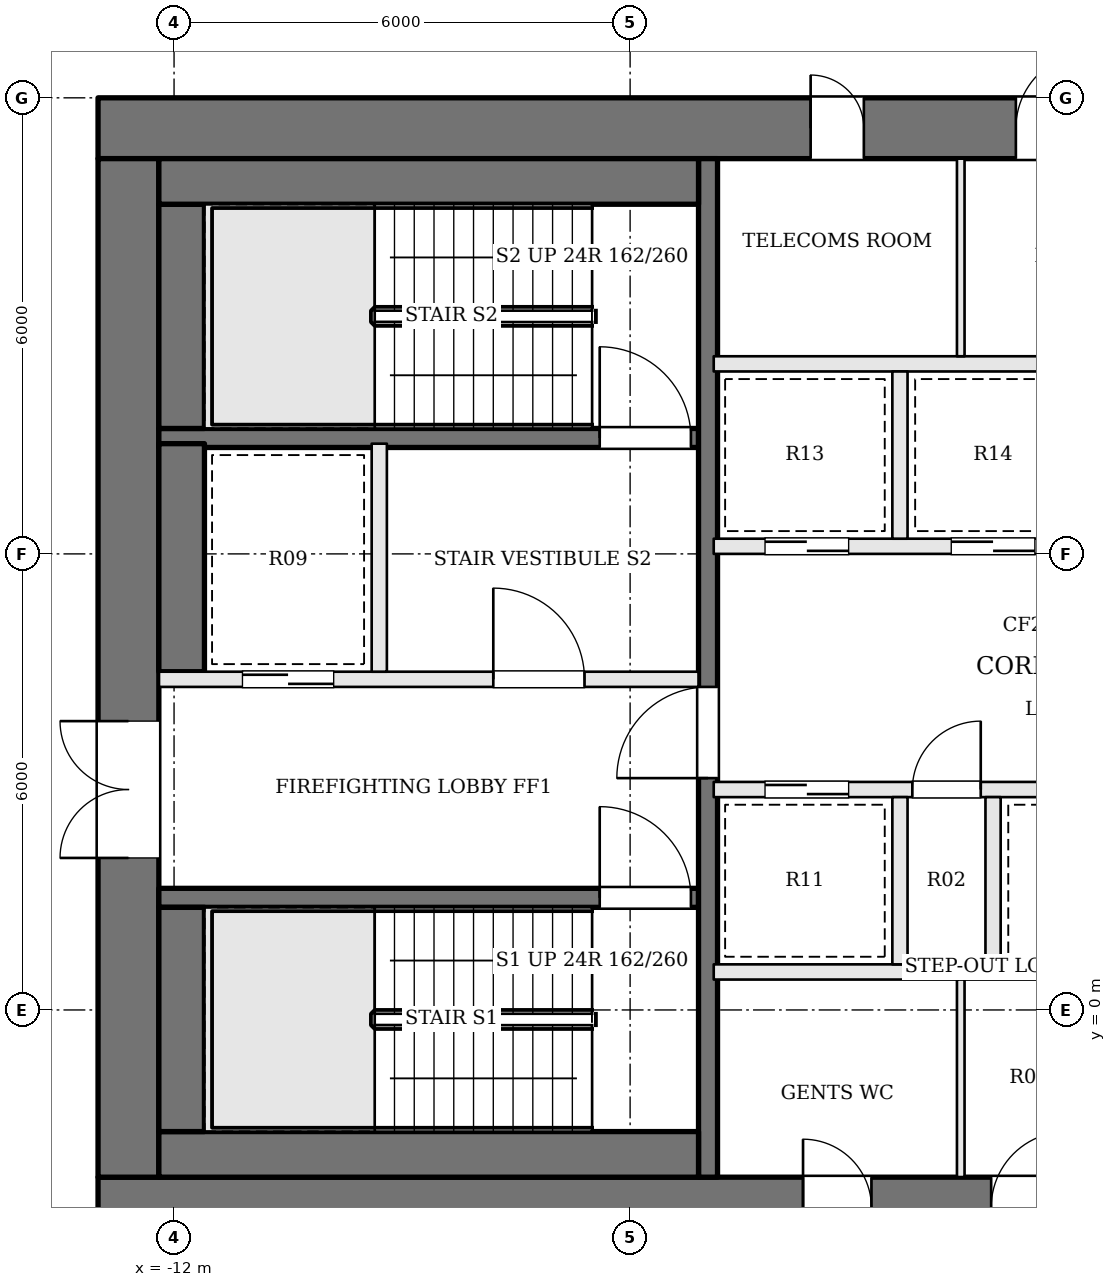
"""IFC4 building model, lengths in metres.
Left out: names, types, materials, properties, quantities, classifications, styles, units other than length and angle.
Written with IfcOpenShell. Run it as: python <this file> out.ifc"""

import sys

from ifc_helpers import new_model, si_unit, direction, frame, frame_2d, origin, place, context, subcontext, project, spatial, rectangle, extrude, element, fill, save


model = new_model("IFC4")
c1 = context("Model", 3, precision=1e-05, world=origin(), true_north=direction((0.0, 1.0)))
c2 = subcontext(c1, "Body", "Model", "MODEL_VIEW")
j1 = project(units=[si_unit("LENGTHUNIT", "METRE"), si_unit("PLANEANGLEUNIT", "RADIAN")], contexts=[c1])
p1 = place(None, origin())
s1 = spatial("IfcSite", under=j1, at=p1, CompositionType="ELEMENT")
p2 = place(p1, origin())
s2 = spatial("IfcBuilding", under=s1, at=p2, CompositionType="ELEMENT")
p3 = place(p2, frame((0.0, 0.0, 209.1)))
s3 = spatial("IfcBuildingStorey", under=s2, at=p3, CompositionType="ELEMENT", Elevation=209.1)
p4 = place(p3, frame((-13.0, 11.6, 0.0), z_axis=(0.0, 0.0, 1.0), x_axis=(1.0, 0.0, 0.0)))
e1 = element("IfcWall", 1, at=p4, inside=s3, PredefinedType="SHEAR", context=c2, shape_type="SweptSolid", body=[
    extrude(rectangle(XDim=26.0, YDim=0.8, at=frame_2d((13.0, 0.0))), origin(), (0.0, 0.0, 1.0), 3.9),
])
p5 = place(p4, frame((9.375, 0.0, 0.0)))
e2 = element("IfcOpeningElement", 2, at=p5, cuts=e1, PredefinedType="OPENING", context=c2, shape_type="SweptSolid", body=[
    extrude(rectangle(XDim=0.7, YDim=2.1, at=frame_2d((0.35, 1.05))), frame((0.0, 0.41, 0.0), z_axis=(0.0, -1.0, 0.0), x_axis=(1.0, 0.0, 0.0)), (0.0, 0.0, 1.0), 0.82),
])
p6 = place(p4, frame((12.075, 0.0, 0.0)))
e3 = element("IfcOpeningElement", 3, at=p6, cuts=e1, PredefinedType="OPENING", context=c2, shape_type="SweptSolid", body=[
    extrude(rectangle(XDim=1.0, YDim=2.1, at=frame_2d((0.5, 1.05))), frame((0.0, 0.41, 0.0), z_axis=(0.0, -1.0, 0.0), x_axis=(1.0, 0.0, 0.0)), (0.0, 0.0, 1.0), 0.82),
])
p7 = place(p4, frame((14.675, 0.0, 0.0)))
e4 = element("IfcOpeningElement", 4, at=p7, cuts=e1, PredefinedType="OPENING", context=c2, shape_type="SweptSolid", body=[
    extrude(rectangle(XDim=0.7, YDim=2.1, at=frame_2d((0.35, 1.05))), frame((0.0, 0.41, 0.0), z_axis=(0.0, -1.0, 0.0), x_axis=(1.0, 0.0, 0.0)), (0.0, 0.0, 1.0), 0.82),
])
p8 = place(p4, frame((16.625, 0.0, 0.0)))
e5 = element("IfcOpeningElement", 5, at=p8, cuts=e1, PredefinedType="OPENING", context=c2, shape_type="SweptSolid", body=[
    extrude(rectangle(XDim=0.9, YDim=2.1, at=frame_2d((0.45, 1.05))), frame((0.0, 0.41, 0.0), z_axis=(0.0, -1.0, 0.0), x_axis=(1.0, 0.0, 0.0)), (0.0, 0.0, 1.0), 0.82),
])
p9 = place(p3, frame((-13.0, -2.6, 0.0), z_axis=(0.0, 0.0, 1.0), x_axis=(1.0, 0.0, 0.0)))
e6 = element("IfcWall", 6, at=p9, inside=s3, PredefinedType="SHEAR", context=c2, shape_type="SweptSolid", body=[
    extrude(rectangle(XDim=26.0, YDim=0.8, at=frame_2d((13.0, 0.0))), origin(), (0.0, 0.0, 1.0), 3.9),
])
p10 = place(p9, frame((9.275, 0.0, 0.0)))
e7 = element("IfcOpeningElement", 7, at=p10, cuts=e6, PredefinedType="OPENING", context=c2, shape_type="SweptSolid", body=[
    extrude(rectangle(XDim=0.9, YDim=2.1, at=frame_2d((0.45, 1.05))), frame((0.0, 0.41, 0.0), z_axis=(0.0, -1.0, 0.0), x_axis=(1.0, 0.0, 0.0)), (0.0, 0.0, 1.0), 0.82),
])
p11 = place(p9, frame((11.75, 0.0, 0.0)))
e8 = element("IfcOpeningElement", 8, at=p11, cuts=e6, PredefinedType="OPENING", context=c2, shape_type="SweptSolid", body=[
    extrude(rectangle(XDim=1.0, YDim=2.1, at=frame_2d((0.5, 1.05))), frame((0.0, 0.41, 0.0), z_axis=(0.0, -1.0, 0.0), x_axis=(1.0, 0.0, 0.0)), (0.0, 0.0, 1.0), 0.82),
])
p12 = place(p9, frame((14.325, 0.0, 0.0)))
e9 = element("IfcOpeningElement", 9, at=p12, cuts=e6, PredefinedType="OPENING", context=c2, shape_type="SweptSolid", body=[
    extrude(rectangle(XDim=0.9, YDim=2.1, at=frame_2d((0.45, 1.05))), frame((0.0, 0.41, 0.0), z_axis=(0.0, -1.0, 0.0), x_axis=(1.0, 0.0, 0.0)), (0.0, 0.0, 1.0), 0.82),
])
p13 = place(p9, frame((16.7, 0.0, 0.0)))
e10 = element("IfcOpeningElement", 10, at=p13, cuts=e6, PredefinedType="OPENING", context=c2, shape_type="SweptSolid", body=[
    extrude(rectangle(XDim=0.9, YDim=2.1, at=frame_2d((0.45, 1.05))), frame((0.0, 0.41, 0.0), z_axis=(0.0, -1.0, 0.0), x_axis=(1.0, 0.0, 0.0)), (0.0, 0.0, 1.0), 0.82),
])
p14 = place(p3, frame((-12.6, -2.2, 0.0), z_axis=(0.0, 0.0, 1.0), x_axis=(0.0, 1.0, 0.0)))
e11 = element("IfcWall", 11, at=p14, inside=s3, PredefinedType="SHEAR", context=c2, shape_type="SweptSolid", body=[
    extrude(rectangle(XDim=13.4, YDim=0.8, at=frame_2d((6.7, 0.0))), origin(), (0.0, 0.0, 1.0), 3.9),
])
p15 = place(p14, frame((4.2, 0.0, 0.0)))
e12 = element("IfcOpeningElement", 12, at=p15, cuts=e11, PredefinedType="OPENING", context=c2, shape_type="SweptSolid", body=[
    extrude(rectangle(XDim=1.8, YDim=2.1, at=frame_2d((0.9, 1.05))), frame((0.0, 0.41, 0.0), z_axis=(0.0, -1.0, 0.0), x_axis=(1.0, 0.0, 0.0)), (0.0, 0.0, 1.0), 0.82),
])
p16 = place(p3, frame((-12.2, 1.475, 0.0), z_axis=(0.0, 0.0, 1.0), x_axis=(1.0, 0.0, 0.0)))
e13 = element("IfcWall", 13, at=p16, inside=s3, PredefinedType="SOLIDWALL", context=c2, shape_type="SweptSolid", body=[
    extrude(rectangle(XDim=7.1, YDim=0.25, at=frame_2d((3.55, 0.0))), origin(), (0.0, 0.0, 1.0), 3.7),
])
p17 = place(p16, frame((5.8, 0.0, 0.0)))
e14 = element("IfcOpeningElement", 14, at=p17, cuts=e13, PredefinedType="OPENING", context=c2, shape_type="SweptSolid", body=[
    extrude(rectangle(XDim=1.2, YDim=2.1, at=frame_2d((0.6, 1.05))), frame((0.0, 0.135, 0.0), z_axis=(0.0, -1.0, 0.0), x_axis=(1.0, 0.0, 0.0)), (0.0, 0.0, 1.0), 0.27),
])
p18 = place(p3, frame((-12.2, 4.35, 0.0), z_axis=(0.0, 0.0, 1.0), x_axis=(1.0, 0.0, 0.0)))
e15 = element("IfcWall", 15, at=p18, inside=s3, PredefinedType="SOLIDWALL", context=c2, shape_type="SweptSolid", body=[
    extrude(rectangle(XDim=7.1, YDim=0.2, at=frame_2d((3.55, 0.0))), origin(), (0.0, 0.0, 1.0), 3.7),
])
p19 = place(p18, frame((4.4, 0.0, 0.0)))
e16 = element("IfcOpeningElement", 16, at=p19, cuts=e15, PredefinedType="OPENING", context=c2, shape_type="SweptSolid", body=[
    extrude(rectangle(XDim=1.2, YDim=2.1, at=frame_2d((0.6, 1.05))), frame((0.0, 0.11, 0.0), z_axis=(0.0, -1.0, 0.0), x_axis=(1.0, 0.0, 0.0)), (0.0, 0.0, 1.0), 0.22),
])
p20 = place(p18, frame((1.1, 0.0, 0.0)))
e17 = element("IfcOpeningElement", 17, at=p20, cuts=e15, PredefinedType="OPENING", context=c2, shape_type="SweptSolid", body=[
    extrude(rectangle(XDim=1.2, YDim=2.1, at=frame_2d((0.6, 1.05))), frame((0.0, 0.11, 0.0), z_axis=(0.0, -1.0, 0.0), x_axis=(1.0, 0.0, 0.0)), (0.0, 0.0, 1.0), 0.22),
])
p21 = place(p3, frame((-12.2, 7.525, 0.0), z_axis=(0.0, 0.0, 1.0), x_axis=(1.0, 0.0, 0.0)))
e18 = element("IfcWall", 18, at=p21, inside=s3, PredefinedType="SOLIDWALL", context=c2, shape_type="SweptSolid", body=[
    extrude(rectangle(XDim=7.1, YDim=0.25, at=frame_2d((3.55, 0.0))), origin(), (0.0, 0.0, 1.0), 3.7),
])
p22 = place(p21, frame((5.8, 0.0, 0.0)))
e19 = element("IfcOpeningElement", 19, at=p22, cuts=e18, PredefinedType="OPENING", context=c2, shape_type="SweptSolid", body=[
    extrude(rectangle(XDim=1.2, YDim=2.1, at=frame_2d((0.6, 1.05))), frame((0.0, 0.135, 0.0), z_axis=(0.0, -1.0, 0.0), x_axis=(1.0, 0.0, 0.0)), (0.0, 0.0, 1.0), 0.27),
])
p23 = place(p3, frame((-9.3, 4.45, 0.0), z_axis=(0.0, 0.0, 1.0), x_axis=(0.0, 1.0, 0.0)))
e20 = element("IfcWall", 20, at=p23, inside=s3, PredefinedType="SOLIDWALL", context=c2, shape_type="SweptSolid", body=[
    extrude(rectangle(XDim=3.0, YDim=0.2, at=frame_2d((1.5, 0.0))), origin(), (0.0, 0.0, 1.0), 3.7),
])
p24 = place(p3, frame((-4.975, -2.2, 0.0), z_axis=(0.0, 0.0, 1.0), x_axis=(0.0, 1.0, 0.0)))
e21 = element("IfcWall", 21, at=p24, inside=s3, PredefinedType="SOLIDWALL", context=c2, shape_type="SweptSolid", body=[
    extrude(rectangle(XDim=13.4, YDim=0.25, at=frame_2d((6.7, 0.0))), origin(), (0.0, 0.0, 1.0), 3.7),
])
p25 = place(p24, frame((5.25, 0.0, 0.0)))
e22 = element("IfcOpeningElement", 22, at=p25, cuts=e21, PredefinedType="OPENING", context=c2, shape_type="SweptSolid", body=[
    extrude(rectangle(XDim=1.2, YDim=2.1, at=frame_2d((0.6, 1.05))), frame((0.0, 0.135, 0.0), z_axis=(0.0, -1.0, 0.0), x_axis=(1.0, 0.0, 0.0)), (0.0, 0.0, 1.0), 0.27),
])
p26 = place(p3, frame((-12.2, -1.9, 0.0), z_axis=(0.0, 0.0, 1.0), x_axis=(1.0, 0.0, 0.0)))
e23 = element("IfcWall", 23, at=p26, inside=s3, PredefinedType="SOLIDWALL", context=c2, shape_type="SweptSolid", body=[
    extrude(rectangle(XDim=7.1, YDim=0.6, at=frame_2d((3.55, 0.0))), origin(), (0.0, 0.0, 1.0), 3.7),
])
p27 = place(p3, frame((-11.9, -1.6, 0.0), z_axis=(0.0, 0.0, 1.0), x_axis=(0.0, 1.0, 0.0)))
e24 = element("IfcWall", 24, at=p27, inside=s3, PredefinedType="SOLIDWALL", context=c2, shape_type="SweptSolid", body=[
    extrude(rectangle(XDim=2.95, YDim=0.6, at=frame_2d((1.475, 0.0))), origin(), (0.0, 0.0, 1.0), 3.7),
])
p28 = place(p3, frame((-11.9, 4.45, 0.0), z_axis=(0.0, 0.0, 1.0), x_axis=(0.0, 1.0, 0.0)))
e25 = element("IfcWall", 25, at=p28, inside=s3, PredefinedType="SOLIDWALL", context=c2, shape_type="SweptSolid", body=[
    extrude(rectangle(XDim=3.0, YDim=0.6, at=frame_2d((1.5, 0.0))), origin(), (0.0, 0.0, 1.0), 3.7),
])
p29 = place(p3, frame((-11.9, 7.65, 0.0), z_axis=(0.0, 0.0, 1.0), x_axis=(0.0, 1.0, 0.0)))
e26 = element("IfcWall", 26, at=p29, inside=s3, PredefinedType="SOLIDWALL", context=c2, shape_type="SweptSolid", body=[
    extrude(rectangle(XDim=2.95, YDim=0.6, at=frame_2d((1.475, 0.0))), origin(), (0.0, 0.0, 1.0), 3.7),
])
p30 = place(p3, frame((-12.2, 10.9, 0.0), z_axis=(0.0, 0.0, 1.0), x_axis=(1.0, 0.0, 0.0)))
e27 = element("IfcWall", 27, at=p30, inside=s3, PredefinedType="SOLIDWALL", context=c2, shape_type="SweptSolid", body=[
    extrude(rectangle(XDim=7.1, YDim=0.6, at=frame_2d((3.55, 0.0))), origin(), (0.0, 0.0, 1.0), 3.7),
])
p31 = place(p3, frame((-4.9, 0.5, 0.0), z_axis=(0.0, 0.0, 1.0), x_axis=(1.0, 0.0, 0.0)))
e28 = element("IfcWall", 28, at=p31, inside=s3, PredefinedType="SOLIDWALL", context=c2, shape_type="SweptSolid", body=[
    extrude(rectangle(XDim=9.8, YDim=0.2, at=frame_2d((4.9, 0.0))), origin(), (0.0, 0.0, 1.0), 3.7),
])
p32 = place(p3, frame((-4.9, 2.9, 0.0), z_axis=(0.0, 0.0, 1.0), x_axis=(1.0, 0.0, 0.0)))
e29 = element("IfcWall", 29, at=p32, inside=s3, PredefinedType="SOLIDWALL", context=c2, shape_type="SweptSolid", body=[
    extrude(rectangle(XDim=9.8, YDim=0.2, at=frame_2d((4.9, 0.0))), origin(), (0.0, 0.0, 1.0), 3.7),
])
p33 = place(p32, frame((0.675, 0.0, 0.0)))
e30 = element("IfcOpeningElement", 30, at=p33, cuts=e29, PredefinedType="OPENING", context=c2, shape_type="SweptSolid", body=[
    extrude(rectangle(XDim=1.1, YDim=2.1, at=frame_2d((0.55, 1.05))), frame((0.0, 0.11, 0.0), z_axis=(0.0, -1.0, 0.0), x_axis=(1.0, 0.0, 0.0)), (0.0, 0.0, 1.0), 0.22),
])
p34 = place(p32, frame((2.613, 0.0, 0.0)))
e31 = element("IfcOpeningElement", 31, at=p34, cuts=e29, PredefinedType="OPENING", context=c2, shape_type="SweptSolid", body=[
    extrude(rectangle(XDim=0.9, YDim=2.1, at=frame_2d((0.45, 1.05))), frame((0.0, 0.11, 0.0), z_axis=(0.0, -1.0, 0.0), x_axis=(1.0, 0.0, 0.0)), (0.0, 0.0, 1.0), 0.22),
])
p35 = place(p32, frame((4.35, 0.0, 0.0)))
e32 = element("IfcOpeningElement", 32, at=p35, cuts=e29, PredefinedType="OPENING", context=c2, shape_type="SweptSolid", body=[
    extrude(rectangle(XDim=1.1, YDim=2.1, at=frame_2d((0.55, 1.05))), frame((0.0, 0.11, 0.0), z_axis=(0.0, -1.0, 0.0), x_axis=(1.0, 0.0, 0.0)), (0.0, 0.0, 1.0), 0.22),
])
p36 = place(p32, frame((7.463, 0.0, 0.0)))
e33 = element("IfcOpeningElement", 33, at=p36, cuts=e29, PredefinedType="OPENING", context=c2, shape_type="SweptSolid", body=[
    extrude(rectangle(XDim=1.0, YDim=2.1, at=frame_2d((0.5, 1.05))), frame((0.0, 0.11, 0.0), z_axis=(0.0, -1.0, 0.0), x_axis=(1.0, 0.0, 0.0)), (0.0, 0.0, 1.0), 0.22),
])
p37 = place(p3, frame((-4.9, 6.1, 0.0), z_axis=(0.0, 0.0, 1.0), x_axis=(1.0, 0.0, 0.0)))
e34 = element("IfcWall", 34, at=p37, inside=s3, PredefinedType="SOLIDWALL", context=c2, shape_type="SweptSolid", body=[
    extrude(rectangle(XDim=9.8, YDim=0.2, at=frame_2d((4.9, 0.0))), origin(), (0.0, 0.0, 1.0), 3.7),
])
p38 = place(p37, frame((0.675, 0.0, 0.0)))
e35 = element("IfcOpeningElement", 35, at=p38, cuts=e34, PredefinedType="OPENING", context=c2, shape_type="SweptSolid", body=[
    extrude(rectangle(XDim=1.1, YDim=2.1, at=frame_2d((0.55, 1.05))), frame((0.0, 0.11, 0.0), z_axis=(0.0, -1.0, 0.0), x_axis=(1.0, 0.0, 0.0)), (0.0, 0.0, 1.0), 0.22),
])
p39 = place(p37, frame((3.125, 0.0, 0.0)))
e36 = element("IfcOpeningElement", 36, at=p39, cuts=e34, PredefinedType="OPENING", context=c2, shape_type="SweptSolid", body=[
    extrude(rectangle(XDim=1.1, YDim=2.1, at=frame_2d((0.55, 1.05))), frame((0.0, 0.11, 0.0), z_axis=(0.0, -1.0, 0.0), x_axis=(1.0, 0.0, 0.0)), (0.0, 0.0, 1.0), 0.22),
])
p40 = place(p37, frame((5.575, 0.0, 0.0)))
e37 = element("IfcOpeningElement", 37, at=p40, cuts=e34, PredefinedType="OPENING", context=c2, shape_type="SweptSolid", body=[
    extrude(rectangle(XDim=1.1, YDim=2.1, at=frame_2d((0.55, 1.05))), frame((0.0, 0.11, 0.0), z_axis=(0.0, -1.0, 0.0), x_axis=(1.0, 0.0, 0.0)), (0.0, 0.0, 1.0), 0.22),
])
p41 = place(p37, frame((8.025, 0.0, 0.0)))
e38 = element("IfcOpeningElement", 38, at=p41, cuts=e34, PredefinedType="OPENING", context=c2, shape_type="SweptSolid", body=[
    extrude(rectangle(XDim=1.1, YDim=2.1, at=frame_2d((0.55, 1.05))), frame((0.0, 0.11, 0.0), z_axis=(0.0, -1.0, 0.0), x_axis=(1.0, 0.0, 0.0)), (0.0, 0.0, 1.0), 0.22),
])
p42 = place(p3, frame((-4.9, 8.5, 0.0), z_axis=(0.0, 0.0, 1.0), x_axis=(1.0, 0.0, 0.0)))
e39 = element("IfcWall", 39, at=p42, inside=s3, PredefinedType="SOLIDWALL", context=c2, shape_type="SweptSolid", body=[
    extrude(rectangle(XDim=9.8, YDim=0.2, at=frame_2d((4.9, 0.0))), origin(), (0.0, 0.0, 1.0), 3.7),
])
for number, where, z_axis, x_axis in (
    (40, (-2.45, 0.6, 0.0), (0.0, 0.0, 1.0), (0.0, 1.0, 0.0)),
    (41, (-1.225, 0.6, 0.0), (0.0, 0.0, 1.0), (0.0, 1.0, 0.0)),
    (42, (-2.45, 6.2, 0.0), (0.0, 0.0, 1.0), (0.0, 1.0, 0.0)),
):
    element("IfcWall", number, at=place(p3, frame(where, z_axis=z_axis, x_axis=x_axis)), inside=s3, PredefinedType="SOLIDWALL", context=c2, shape_type="SweptSolid", body=[
        extrude(rectangle(XDim=2.2, YDim=0.2, at=frame_2d((1.1, 0.0))), origin(), (0.0, 0.0, 1.0), 3.7),
    ])
for number, where, z_axis, x_axis in (
    (43, (-1.65, -2.2, 0.0), (0.0, 0.0, 1.0), (0.0, 1.0, 0.0)),
    (44, (-1.65, 8.6, 0.0), (0.0, 0.0, 1.0), (0.0, 1.0, 0.0)),
):
    element("IfcWall", number, at=place(p3, frame(where, z_axis=z_axis, x_axis=x_axis)), inside=s3, PredefinedType="PARTITIONING", context=c2, shape_type="SweptSolid", body=[
        extrude(rectangle(XDim=2.6, YDim=0.1, at=frame_2d((1.3, 0.0))), origin(), (0.0, 0.0, 1.0), 3.7),
    ])
p43 = place(p15, origin())
e45 = element("IfcDoor", 45, at=p43, inside=s3, OperationType="DOUBLE_DOOR_SINGLE_SWING", PredefinedType="DOOR", context=c2, shape_type="SweptSolid", body=[
    extrude(rectangle(XDim=1.8, YDim=2.1, at=frame_2d((0.9, 1.05))), frame((0.0, 0.025, 0.0), z_axis=(0.0, -1.0, 0.0), x_axis=(1.0, 0.0, 0.0)), (0.0, 0.0, 1.0), 0.05),
])
fill(e12, e45)
p44 = place(p25, origin())
e46 = element("IfcDoor", 46, at=p44, inside=s3, OperationType="SINGLE_SWING_LEFT", PredefinedType="DOOR", context=c2, shape_type="SweptSolid", body=[
    extrude(rectangle(XDim=1.2, YDim=2.1, at=frame_2d((0.6, 1.05))), frame((0.0, 0.025, 0.0), z_axis=(0.0, -1.0, 0.0), x_axis=(1.0, 0.0, 0.0)), (0.0, 0.0, 1.0), 0.05),
])
fill(e22, e46)
p45 = place(p19, origin())
e47 = element("IfcDoor", 47, at=p45, inside=s3, OperationType="SINGLE_SWING_LEFT", PredefinedType="DOOR", context=c2, shape_type="SweptSolid", body=[
    extrude(rectangle(XDim=1.2, YDim=2.1, at=frame_2d((0.6, 1.05))), frame((0.0, 0.025, 0.0), z_axis=(0.0, -1.0, 0.0), x_axis=(1.0, 0.0, 0.0)), (0.0, 0.0, 1.0), 0.05),
])
fill(e16, e47)
p46 = place(p17, origin())
e48 = element("IfcDoor", 48, at=p46, inside=s3, OperationType="SINGLE_SWING_LEFT", PredefinedType="DOOR", context=c2, shape_type="SweptSolid", body=[
    extrude(rectangle(XDim=1.2, YDim=2.1, at=frame_2d((0.6, 1.05))), frame((0.0, 0.025, 0.0), z_axis=(0.0, -1.0, 0.0), x_axis=(1.0, 0.0, 0.0)), (0.0, 0.0, 1.0), 0.05),
])
fill(e14, e48)
p47 = place(p22, origin())
e49 = element("IfcDoor", 49, at=p47, inside=s3, OperationType="SINGLE_SWING_LEFT", PredefinedType="DOOR", context=c2, shape_type="SweptSolid", body=[
    extrude(rectangle(XDim=1.2, YDim=2.1, at=frame_2d((0.6, 1.05))), frame((0.0, 0.025, 0.0), z_axis=(0.0, -1.0, 0.0), x_axis=(1.0, 0.0, 0.0)), (0.0, 0.0, 1.0), 0.05),
])
fill(e19, e49)
p48 = place(p20, origin())
e50 = element("IfcDoor", 50, at=p48, inside=s3, OperationType="SLIDING_TO_RIGHT", PredefinedType="DOOR", context=c2, shape_type="SweptSolid", body=[
    extrude(rectangle(XDim=1.2, YDim=2.1, at=frame_2d((0.6, 1.05))), frame((0.0, 0.025, 0.0), z_axis=(0.0, -1.0, 0.0), x_axis=(1.0, 0.0, 0.0)), (0.0, 0.0, 1.0), 0.05),
])
fill(e17, e50)
p49 = place(p33, origin())
e51 = element("IfcDoor", 51, at=p49, inside=s3, OperationType="SLIDING_TO_RIGHT", PredefinedType="DOOR", context=c2, shape_type="SweptSolid", body=[
    extrude(rectangle(XDim=1.1, YDim=2.1, at=frame_2d((0.55, 1.05))), frame((0.0, 0.025, 0.0), z_axis=(0.0, -1.0, 0.0), x_axis=(1.0, 0.0, 0.0)), (0.0, 0.0, 1.0), 0.05),
])
fill(e30, e51)
p50 = place(p34, origin())
e52 = element("IfcDoor", 52, at=p50, inside=s3, OperationType="SINGLE_SWING_RIGHT", PredefinedType="DOOR", context=c2, shape_type="SweptSolid", body=[
    extrude(rectangle(XDim=0.9, YDim=2.1, at=frame_2d((0.45, 1.05))), frame((0.0, 0.025, 0.0), z_axis=(0.0, -1.0, 0.0), x_axis=(1.0, 0.0, 0.0)), (0.0, 0.0, 1.0), 0.05),
])
fill(e31, e52)
p51 = place(p38, origin())
e53 = element("IfcDoor", 53, at=p51, inside=s3, OperationType="SLIDING_TO_RIGHT", PredefinedType="DOOR", context=c2, shape_type="SweptSolid", body=[
    extrude(rectangle(XDim=1.1, YDim=2.1, at=frame_2d((0.55, 1.05))), frame((0.0, 0.025, 0.0), z_axis=(0.0, -1.0, 0.0), x_axis=(1.0, 0.0, 0.0)), (0.0, 0.0, 1.0), 0.05),
])
fill(e35, e53)
p52 = place(p39, origin())
e54 = element("IfcDoor", 54, at=p52, inside=s3, OperationType="SLIDING_TO_LEFT", PredefinedType="DOOR", context=c2, shape_type="SweptSolid", body=[
    extrude(rectangle(XDim=1.1, YDim=2.1, at=frame_2d((0.55, 1.05))), frame((0.0, 0.025, 0.0), z_axis=(0.0, -1.0, 0.0), x_axis=(1.0, 0.0, 0.0)), (0.0, 0.0, 1.0), 0.05),
])
fill(e36, e54)
p53 = place(p10, origin())
e55 = element("IfcDoor", 55, at=p53, inside=s3, OperationType="SINGLE_SWING_LEFT", PredefinedType="DOOR", context=c2, shape_type="SweptSolid", body=[
    extrude(rectangle(XDim=0.9, YDim=2.1, at=frame_2d((0.45, 1.05))), frame((0.0, 0.025, 0.0), z_axis=(0.0, -1.0, 0.0), x_axis=(1.0, 0.0, 0.0)), (0.0, 0.0, 1.0), 0.05),
])
fill(e7, e55)
p54 = place(p11, origin())
e56 = element("IfcDoor", 56, at=p54, inside=s3, OperationType="SINGLE_SWING_RIGHT", PredefinedType="DOOR", context=c2, shape_type="SweptSolid", body=[
    extrude(rectangle(XDim=1.0, YDim=2.1, at=frame_2d((0.5, 1.05))), frame((0.0, 0.025, 0.0), z_axis=(0.0, -1.0, 0.0), x_axis=(1.0, 0.0, 0.0)), (0.0, 0.0, 1.0), 0.05),
])
fill(e8, e56)
p55 = place(p5, origin())
e57 = element("IfcDoor", 57, at=p55, inside=s3, OperationType="SINGLE_SWING_LEFT", PredefinedType="DOOR", context=c2, shape_type="SweptSolid", body=[
    extrude(rectangle(XDim=0.7, YDim=2.1, at=frame_2d((0.35, 1.05))), frame((0.0, 0.025, 0.0), z_axis=(0.0, -1.0, 0.0), x_axis=(1.0, 0.0, 0.0)), (0.0, 0.0, 1.0), 0.05),
])
fill(e2, e57)
p56 = place(p6, origin())
e58 = element("IfcDoor", 58, at=p56, inside=s3, OperationType="SINGLE_SWING_RIGHT", PredefinedType="DOOR", context=c2, shape_type="SweptSolid", body=[
    extrude(rectangle(XDim=1.0, YDim=2.1, at=frame_2d((0.5, 1.05))), frame((0.0, 0.025, 0.0), z_axis=(0.0, -1.0, 0.0), x_axis=(1.0, 0.0, 0.0)), (0.0, 0.0, 1.0), 0.05),
])
fill(e3, e58)
save(model, sys.argv[1])
